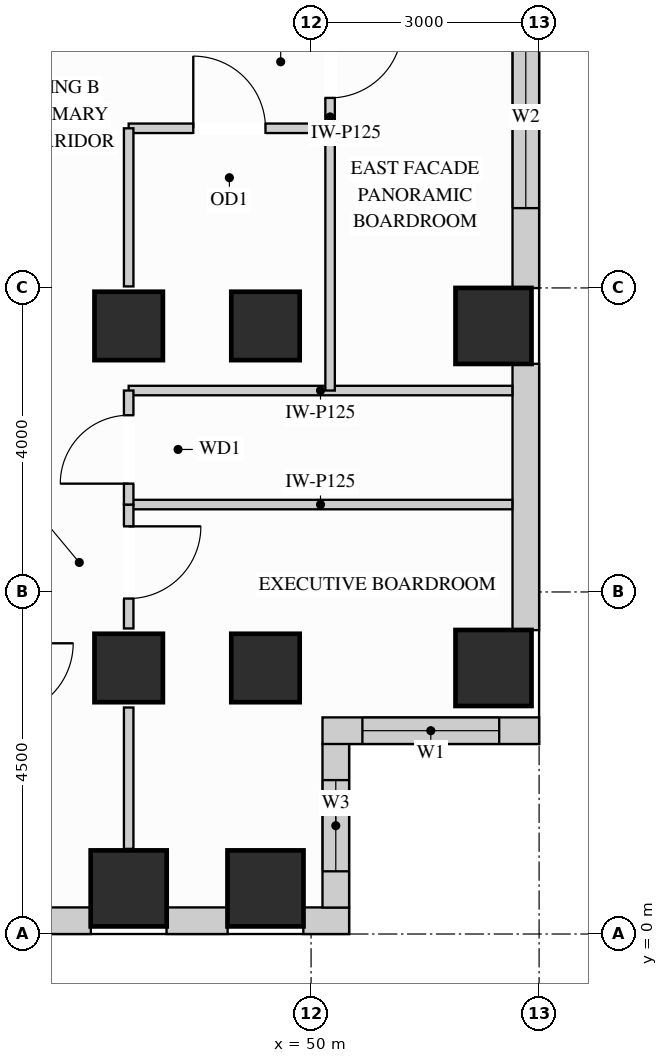
"""IFC4 building model, lengths in metres.
Left out: names, types, materials, properties, quantities, classifications, styles, units other than length and angle.
Written with IfcOpenShell. Run it as: python <this file> out.ifc"""

import sys

from ifc_helpers import new_model, si_unit, direction, frame, frame_2d, origin, origin_2d, place, context, subcontext, project, spatial, rectangle, extrude, source, transform, mapped, element, fill, save


model = new_model("IFC4")
c1 = context("Model", 3, precision=1e-05, world=origin(), true_north=direction((0.0, 1.0)))
c2 = subcontext(c1, "Body", "Model", "MODEL_VIEW")
j1 = project(units=[si_unit("LENGTHUNIT", "METRE"), si_unit("PLANEANGLEUNIT", "RADIAN")], contexts=[c1])
p1 = place(None, origin())
s1 = spatial("IfcSite", under=j1, at=p1, CompositionType="ELEMENT")
p2 = place(p1, origin())
s2 = spatial("IfcBuilding", under=s1, at=p2, CompositionType="ELEMENT")
p3 = place(p2, frame((0.0, 0.0, 189.9)))
s3 = spatial("IfcBuildingStorey", under=s2, at=p3, CompositionType="ELEMENT", Elevation=189.9)
m1 = source(origin(), c2, "Body", "SweptSolid", [
    extrude(rectangle(XDim=0.9, YDim=0.9, at=origin_2d()), origin(), (0.0, 0.0, 1.0), 3.4),
])
for number, where, z_axis, x_axis in (
    (1, (47.6, 3.5, 0.0), (0.0, 0.0, 1.0), (1.0, 0.0, 0.0)),
    (2, (47.6, 8.0, 0.0), (0.0, 0.0, 1.0), (1.0, 0.0, 0.0)),
    (3, (49.4, 3.5, 0.0), (0.0, 0.0, 1.0), (1.0, 0.0, 0.0)),
    (4, (49.4, 8.0, 0.0), (0.0, 0.0, 1.0), (1.0, 0.0, 0.0)),
):
    element("IfcColumn", number, at=place(p3, frame(where, z_axis=z_axis, x_axis=x_axis)), inside=s3, PredefinedType="COLUMN", context=c2, shape_type="MappedRepresentation", body=[
        mapped(m1, transform((0.0, 0.0, 0.0), x_axis=(1.0, 0.0, 0.0), y_axis=(0.0, 1.0, 0.0), z_axis=(0.0, 0.0, 1.0))),
    ])
m2 = source(origin(), c2, "Body", "SweptSolid", [
    extrude(rectangle(XDim=1.0, YDim=1.0, at=origin_2d()), origin(), (0.0, 0.0, 1.0), 3.4),
])
for number, where, z_axis, x_axis in (
    (5, (52.4, 3.5, 0.0), (0.0, 0.0, 1.0), (1.0, 0.0, 0.0)),
    (6, (52.4, 8.0, 0.0), (0.0, 0.0, 1.0), (1.0, 0.0, 0.0)),
    (7, (47.6, 0.6, 0.0), (0.0, 0.0, 1.0), (1.0, 0.0, 0.0)),
    (8, (49.4, 0.6, 0.0), (0.0, 0.0, 1.0), (1.0, 0.0, 0.0)),
):
    element("IfcColumn", number, at=place(p3, frame(where, z_axis=z_axis, x_axis=x_axis)), inside=s3, PredefinedType="COLUMN", context=c2, shape_type="MappedRepresentation", body=[
        mapped(m2, transform((0.0, 0.0, 0.0), x_axis=(1.0, 0.0, 0.0), y_axis=(0.0, 1.0, 0.0), z_axis=(0.0, 0.0, 1.0))),
    ])
p4 = place(p3, frame((40.498, 0.175, 0.0), z_axis=(0.0, 0.0, 1.0), x_axis=(1.0, 0.0, 0.0)))
e9 = element("IfcWall", 9, at=p4, inside=s3, PredefinedType="SOLIDWALL", context=c2, shape_type="SweptSolid", body=[
    extrude(rectangle(XDim=6.604, YDim=0.35, at=frame_2d((3.302, 0.0))), origin(), (0.0, 0.0, 1.0), 2.448),
])
p5 = place(p4, frame((0.737, 0.0, 0.78)))
e10 = element("IfcOpeningElement", 10, at=p5, cuts=e9, PredefinedType="OPENING", context=c2, shape_type="SweptSolid", body=[
    extrude(rectangle(XDim=1.8, YDim=1.488, at=frame_2d((0.9, 0.744))), frame((0.0, 0.185, 0.0), z_axis=(0.0, -1.0, 0.0), x_axis=(1.0, 0.0, 0.0)), (0.0, 0.0, 1.0), 0.37),
])
p6 = place(p4, frame((2.955, 0.0, 0.78)))
e11 = element("IfcOpeningElement", 11, at=p6, cuts=e9, PredefinedType="OPENING", context=c2, shape_type="SweptSolid", body=[
    extrude(rectangle(XDim=1.8, YDim=1.488, at=frame_2d((0.9, 0.744))), frame((0.0, 0.185, 0.0), z_axis=(0.0, -1.0, 0.0), x_axis=(1.0, 0.0, 0.0)), (0.0, 0.0, 1.0), 0.37),
])
m3 = source(origin(), c2, "Body", "SweptSolid", [
    extrude(rectangle(XDim=0.804, YDim=0.35, at=frame_2d((0.402, 0.0))), origin(), (0.0, 0.0, 1.0), 3.385),
])
p7 = place(p3, frame((48.098, 0.175, 0.0), z_axis=(0.0, 0.0, 1.0), x_axis=(1.0, 0.0, 0.0)))
e12 = element("IfcWall", 12, at=p7, inside=s3, PredefinedType="SOLIDWALL", context=c2, shape_type="MappedRepresentation", body=[
    mapped(m3, transform((0.0, 0.0, 0.0), x_axis=(1.0, 0.0, 0.0), y_axis=(0.0, 1.0, 0.0), z_axis=(0.0, 0.0, 1.0))),
])
m4 = source(origin(), c2, "Body", "SweptSolid", [
    extrude(rectangle(XDim=0.602, YDim=0.35, at=frame_2d((0.301, 0.0))), origin(), (0.0, 0.0, 1.0), 3.385),
])
p8 = place(p3, frame((49.898, 0.175, 0.0), z_axis=(0.0, 0.0, 1.0), x_axis=(1.0, 0.0, 0.0)))
e13 = element("IfcWall", 13, at=p8, inside=s3, PredefinedType="SOLIDWALL", context=c2, shape_type="MappedRepresentation", body=[
    mapped(m4, transform((0.0, 0.0, 0.0), x_axis=(1.0, 0.0, 0.0), y_axis=(0.0, 1.0, 0.0), z_axis=(0.0, 0.0, 1.0))),
])
p9 = place(p3, frame((50.325, 0.348, 0.0), z_axis=(0.0, 0.0, 1.0), x_axis=(0.0, 1.0, 0.0)))
e14 = element("IfcWall", 14, at=p9, inside=s3, PredefinedType="SOLIDWALL", context=c2, shape_type="SweptSolid", body=[
    extrude(rectangle(XDim=2.154, YDim=0.35, at=frame_2d((1.077, 0.0))), origin(), (0.0, 0.0, 1.0), 3.385),
])
p10 = place(p9, frame((0.477, 0.0, 0.78)))
e15 = element("IfcOpeningElement", 15, at=p10, cuts=e14, PredefinedType="OPENING", context=c2, shape_type="SweptSolid", body=[
    extrude(rectangle(XDim=1.2, YDim=2.1, at=frame_2d((0.6, 1.05))), frame((0.0, 0.185, 0.0), z_axis=(0.0, -1.0, 0.0), x_axis=(1.0, 0.0, 0.0)), (0.0, 0.0, 1.0), 0.37),
])
p11 = place(p3, frame((50.15, 2.675, 0.0), z_axis=(0.0, 0.0, 1.0), x_axis=(1.0, 0.0, 0.0)))
e16 = element("IfcWall", 16, at=p11, inside=s3, PredefinedType="SOLIDWALL", context=c2, shape_type="SweptSolid", body=[
    extrude(rectangle(XDim=2.85, YDim=0.35, at=frame_2d((1.425, 0.0))), origin(), (0.0, 0.0, 1.0), 3.385),
])
p12 = place(p11, frame((0.525, 0.0, 0.78)))
e17 = element("IfcOpeningElement", 17, at=p12, cuts=e16, PredefinedType="OPENING", context=c2, shape_type="SweptSolid", body=[
    extrude(rectangle(XDim=1.8, YDim=2.1, at=frame_2d((0.9, 1.05))), frame((0.0, 0.185, 0.0), z_axis=(0.0, -1.0, 0.0), x_axis=(1.0, 0.0, 0.0)), (0.0, 0.0, 1.0), 0.37),
])
m5 = source(origin(), c2, "Body", "SweptSolid", [
    extrude(rectangle(XDim=3.504, YDim=0.35, at=frame_2d((1.752, 0.0))), origin(), (0.0, 0.0, 1.0), 2.612),
])
p13 = place(p3, frame((52.825, 3.998, 0.0), z_axis=(0.0, 0.0, 1.0), x_axis=(0.0, 1.0, 0.0)))
e18 = element("IfcWall", 18, at=p13, inside=s3, PredefinedType="SOLIDWALL", context=c2, shape_type="MappedRepresentation", body=[
    mapped(m5, transform((0.0, 0.0, 0.0), x_axis=(1.0, 0.0, 0.0), y_axis=(0.0, 1.0, 0.0), z_axis=(0.0, 0.0, 1.0))),
])
p14 = place(p3, frame((52.825, 8.498, 0.0), z_axis=(0.0, 0.0, 1.0), x_axis=(0.0, 1.0, 0.0)))
e19 = element("IfcWall", 19, at=p14, inside=s3, PredefinedType="SOLIDWALL", context=c2, shape_type="SweptSolid", body=[
    extrude(rectangle(XDim=4.504, YDim=0.35, at=frame_2d((2.252, 0.0))), origin(), (0.0, 0.0, 1.0), 2.612),
])
p15 = place(p14, frame((1.052, 0.0, 0.78)))
e20 = element("IfcOpeningElement", 20, at=p15, cuts=e19, PredefinedType="OPENING", context=c2, shape_type="SweptSolid", body=[
    extrude(rectangle(XDim=2.4, YDim=1.652, at=frame_2d((1.2, 0.826))), frame((0.0, 0.185, 0.0), z_axis=(0.0, -1.0, 0.0), x_axis=(1.0, 0.0, 0.0)), (0.0, 0.0, 1.0), 0.37),
])
p16 = place(p3, frame((50.25, 10.6, 0.0), z_axis=(0.0, 0.0, 1.0), x_axis=(0.0, 1.0, 0.0)))
e21 = element("IfcWall", 21, at=p16, inside=s3, PredefinedType="PARTITIONING", context=c2, shape_type="SweptSolid", body=[
    extrude(rectangle(XDim=1.75, YDim=0.125, at=frame_2d((0.875, 0.0))), origin(), (0.0, 0.0, 1.0), 3.385),
])
p17 = place(p16, frame((0.4, 0.0, 0.0)))
e22 = element("IfcOpeningElement", 22, at=p17, cuts=e21, PredefinedType="OPENING", context=c2, shape_type="SweptSolid", body=[
    extrude(rectangle(XDim=0.95, YDim=2.15, at=frame_2d((0.475, 1.075))), frame((0.0, 0.073, 0.0), z_axis=(0.0, -1.0, 0.0), x_axis=(1.0, 0.0, 0.0)), (0.0, 0.0, 1.0), 0.145),
])
m6 = source(origin(), c2, "Body", "SweptSolid", [
    extrude(rectangle(XDim=5.048, YDim=0.125, at=frame_2d((2.524, 0.0))), origin(), (0.0, 0.0, 1.0), 3.385),
])
for number, where, z_axis, x_axis in (
    (23, (47.6, 5.65, 0.0), (0.0, 0.0, 1.0), (1.0, 0.0, 0.0)),
    (24, (47.6, 7.15, 0.0), (0.0, 0.0, 1.0), (1.0, 0.0, 0.0)),
):
    element("IfcWall", number, at=place(p3, frame(where, z_axis=z_axis, x_axis=x_axis)), inside=s3, PredefinedType="PARTITIONING", context=c2, shape_type="MappedRepresentation", body=[
        mapped(m6, transform((0.0, 0.0, 0.0), x_axis=(1.0, 0.0, 0.0), y_axis=(0.0, 1.0, 0.0), z_axis=(0.0, 0.0, 1.0))),
    ])
p18 = place(p3, frame((47.6, 10.6, 0.0), z_axis=(0.0, 0.0, 1.0), x_axis=(1.0, 0.0, 0.0)))
e25 = element("IfcWall", 25, at=p18, inside=s3, PredefinedType="PARTITIONING", context=c2, shape_type="SweptSolid", body=[
    extrude(rectangle(XDim=2.65, YDim=0.125, at=frame_2d((1.325, 0.0))), origin(), (0.0, 0.0, 1.0), 2.773),
])
p19 = place(p18, frame((0.85, 0.0, 0.0)))
e26 = element("IfcOpeningElement", 26, at=p19, cuts=e25, PredefinedType="OPENING", context=c2, shape_type="SweptSolid", body=[
    extrude(rectangle(XDim=0.95, YDim=2.15, at=frame_2d((0.475, 1.075))), frame((0.0, 0.073, 0.0), z_axis=(0.0, -1.0, 0.0), x_axis=(1.0, 0.0, 0.0)), (0.0, 0.0, 1.0), 0.145),
])
m7 = source(origin(), c2, "Body", "SweptSolid", [
    extrude(rectangle(XDim=3.45, YDim=0.125, at=frame_2d((1.725, 0.0))), origin(), (0.0, 0.0, 1.0), 3.385),
])
p20 = place(p3, frame((50.25, 7.15, 0.0), z_axis=(0.0, 0.0, 1.0), x_axis=(0.0, 1.0, 0.0)))
e27 = element("IfcWall", 27, at=p20, inside=s3, PredefinedType="PARTITIONING", context=c2, shape_type="MappedRepresentation", body=[
    mapped(m7, transform((0.0, 0.0, 0.0), x_axis=(1.0, 0.0, 0.0), y_axis=(0.0, 1.0, 0.0), z_axis=(0.0, 0.0, 1.0))),
])
p21 = place(p3, frame((47.6, 4.02, 0.0), z_axis=(0.0, 0.0, 1.0), x_axis=(0.0, 1.0, 0.0)))
e28 = element("IfcWall", 28, at=p21, inside=s3, PredefinedType="PARTITIONING", context=c2, shape_type="SweptSolid", body=[
    extrude(rectangle(XDim=1.63, YDim=0.125, at=frame_2d((0.815, 0.0))), origin(), (0.0, 0.0, 1.0), 2.773),
])
p22 = place(p21, frame((0.393, 0.0, 0.0)))
e29 = element("IfcOpeningElement", 29, at=p22, cuts=e28, PredefinedType="OPENING", context=c2, shape_type="SweptSolid", body=[
    extrude(rectangle(XDim=0.95, YDim=2.15, at=frame_2d((0.475, 1.075))), frame((0.0, 0.073, 0.0), z_axis=(0.0, -1.0, 0.0), x_axis=(1.0, 0.0, 0.0)), (0.0, 0.0, 1.0), 0.145),
])
m8 = source(origin(), c2, "Body", "SweptSolid", [
    extrude(rectangle(XDim=1.86, YDim=0.125, at=frame_2d((0.93, 0.0))), origin(), (0.0, 0.0, 1.0), 2.773),
])
p23 = place(p3, frame((47.6, 1.12, 0.0), z_axis=(0.0, 0.0, 1.0), x_axis=(0.0, 1.0, 0.0)))
e30 = element("IfcWall", 30, at=p23, inside=s3, PredefinedType="PARTITIONING", context=c2, shape_type="MappedRepresentation", body=[
    mapped(m8, transform((0.0, 0.0, 0.0), x_axis=(1.0, 0.0, 0.0), y_axis=(0.0, 1.0, 0.0), z_axis=(0.0, 0.0, 1.0))),
])
m9 = source(origin(), c2, "Body", "SweptSolid", [
    extrude(rectangle(XDim=2.08, YDim=0.125, at=frame_2d((1.04, 0.0))), origin(), (0.0, 0.0, 1.0), 2.773),
])
p24 = place(p3, frame((47.6, 8.52, 0.0), z_axis=(0.0, 0.0, 1.0), x_axis=(0.0, 1.0, 0.0)))
e31 = element("IfcWall", 31, at=p24, inside=s3, PredefinedType="PARTITIONING", context=c2, shape_type="MappedRepresentation", body=[
    mapped(m9, transform((0.0, 0.0, 0.0), x_axis=(1.0, 0.0, 0.0), y_axis=(0.0, 1.0, 0.0), z_axis=(0.0, 0.0, 1.0))),
])
p25 = place(p3, frame((47.6, 5.65, 0.0), z_axis=(0.0, 0.0, 1.0), x_axis=(0.0, 1.0, 0.0)))
e32 = element("IfcWall", 32, at=p25, inside=s3, PredefinedType="PARTITIONING", context=c2, shape_type="SweptSolid", body=[
    extrude(rectangle(XDim=1.5, YDim=0.125, at=frame_2d((0.75, 0.0))), origin(), (0.0, 0.0, 1.0), 2.773),
])
p26 = place(p25, frame((0.275, 0.0, 0.0)))
e33 = element("IfcOpeningElement", 33, at=p26, cuts=e32, PredefinedType="OPENING", context=c2, shape_type="SweptSolid", body=[
    extrude(rectangle(XDim=0.9, YDim=2.15, at=frame_2d((0.45, 1.075))), frame((0.0, 0.073, 0.0), z_axis=(0.0, -1.0, 0.0), x_axis=(1.0, 0.0, 0.0)), (0.0, 0.0, 1.0), 0.145),
])
m10 = source(origin(), c2, "Body", "SweptSolid", [
    extrude(rectangle(XDim=0.95, YDim=2.15, at=frame_2d((0.475, 1.075))), frame((0.0, 0.025, 0.0), z_axis=(0.0, -1.0, 0.0), x_axis=(1.0, 0.0, 0.0)), (0.0, 0.0, 1.0), 0.05),
])
p27 = place(p22, origin())
e34 = element("IfcDoor", 34, at=p27, inside=s3, OperationType="SINGLE_SWING_RIGHT", PredefinedType="DOOR", context=c2, shape_type="MappedRepresentation", body=[
    mapped(m10, transform((0.0, 0.0, 0.0), x_axis=(1.0, 0.0, 0.0), y_axis=(0.0, 1.0, 0.0), z_axis=(0.0, 0.0, 1.0))),
])
fill(e29, e34)
p28 = place(p19, origin())
e35 = element("IfcDoor", 35, at=p28, inside=s3, OperationType="SINGLE_SWING_LEFT", PredefinedType="DOOR", context=c2, shape_type="MappedRepresentation", body=[
    mapped(m10, transform((0.0, 0.0, 0.0), x_axis=(1.0, 0.0, 0.0), y_axis=(0.0, 1.0, 0.0), z_axis=(0.0, 0.0, 1.0))),
])
fill(e26, e35)
p29 = place(p17, origin())
e36 = element("IfcDoor", 36, at=p29, inside=s3, OperationType="SINGLE_SWING_RIGHT", PredefinedType="DOOR", context=c2, shape_type="MappedRepresentation", body=[
    mapped(m10, transform((0.0, 0.0, 0.0), x_axis=(1.0, 0.0, 0.0), y_axis=(0.0, 1.0, 0.0), z_axis=(0.0, 0.0, 1.0))),
])
fill(e22, e36)
m11 = source(origin(), c2, "Body", "SweptSolid", [
    extrude(rectangle(XDim=0.9, YDim=2.15, at=frame_2d((0.45, 1.075))), frame((0.0, 0.025, 0.0), z_axis=(0.0, -1.0, 0.0), x_axis=(1.0, 0.0, 0.0)), (0.0, 0.0, 1.0), 0.05),
])
p30 = place(p26, origin())
e37 = element("IfcDoor", 37, at=p30, inside=s3, OperationType="SINGLE_SWING_LEFT", PredefinedType="DOOR", context=c2, shape_type="MappedRepresentation", body=[
    mapped(m11, transform((0.0, 0.0, 0.0), x_axis=(1.0, 0.0, 0.0), y_axis=(0.0, 1.0, 0.0), z_axis=(0.0, 0.0, 1.0))),
])
fill(e33, e37)
m12 = source(origin(), c2, "Body", "SweptSolid", [
    extrude(rectangle(XDim=1.8, YDim=2.1, at=frame_2d((0.9, 1.05))), frame((0.0, 0.03, 0.0), z_axis=(0.0, -1.0, 0.0), x_axis=(1.0, 0.0, 0.0)), (0.0, 0.0, 1.0), 0.06),
])
p31 = place(p12, origin())
e38 = element("IfcWindow", 38, at=p31, inside=s3, PartitioningType="SINGLE_PANEL", PredefinedType="WINDOW", context=c2, shape_type="MappedRepresentation", body=[
    mapped(m12, transform((0.0, 0.0, 0.0), x_axis=(1.0, 0.0, 0.0), y_axis=(0.0, 1.0, 0.0), z_axis=(0.0, 0.0, 1.0))),
])
fill(e17, e38)
m13 = source(origin(), c2, "Body", "SweptSolid", [
    extrude(rectangle(XDim=2.4, YDim=1.652, at=frame_2d((1.2, 0.826))), frame((0.0, 0.03, 0.0), z_axis=(0.0, -1.0, 0.0), x_axis=(1.0, 0.0, 0.0)), (0.0, 0.0, 1.0), 0.06),
])
p32 = place(p15, origin())
e39 = element("IfcWindow", 39, at=p32, inside=s3, PartitioningType="SINGLE_PANEL", PredefinedType="WINDOW", context=c2, shape_type="MappedRepresentation", body=[
    mapped(m13, transform((0.0, 0.0, 0.0), x_axis=(1.0, 0.0, 0.0), y_axis=(0.0, 1.0, 0.0), z_axis=(0.0, 0.0, 1.0))),
])
fill(e20, e39)
m14 = source(origin(), c2, "Body", "SweptSolid", [
    extrude(rectangle(XDim=1.2, YDim=2.1, at=frame_2d((0.6, 1.05))), frame((0.0, 0.03, 0.0), z_axis=(0.0, -1.0, 0.0), x_axis=(1.0, 0.0, 0.0)), (0.0, 0.0, 1.0), 0.06),
])
p33 = place(p10, origin())
e40 = element("IfcWindow", 40, at=p33, inside=s3, PartitioningType="SINGLE_PANEL", PredefinedType="WINDOW", context=c2, shape_type="MappedRepresentation", body=[
    mapped(m14, transform((0.0, 0.0, 0.0), x_axis=(1.0, 0.0, 0.0), y_axis=(0.0, 1.0, 0.0), z_axis=(0.0, 0.0, 1.0))),
])
fill(e15, e40)
save(model, sys.argv[1])
